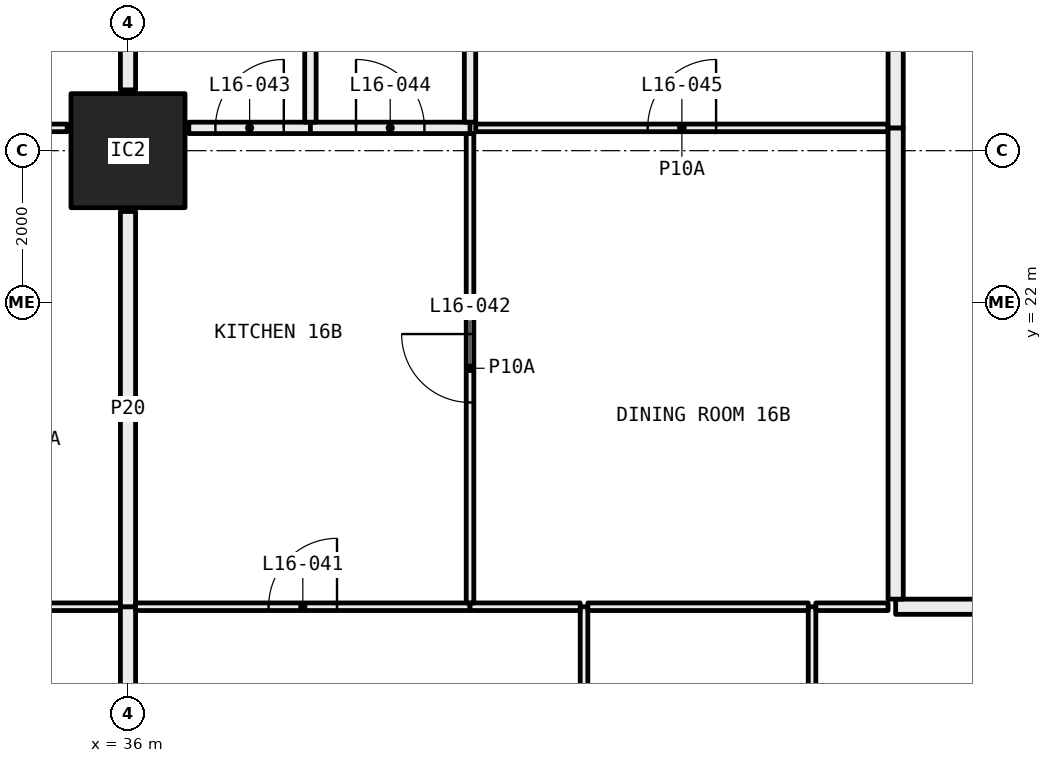
"""IFC4 building model, lengths in metres.
Left out: names, types, materials, properties, quantities, classifications, styles, units other than length and angle.
Written with IfcOpenShell. Run it as: python <this file> out.ifc"""

import sys

from ifc_helpers import new_model, si_unit, direction, frame, frame_2d, origin, origin_2d, place, context, subcontext, project, spatial, rectangle, hollow_rectangle, extrude, element, fill, save


model = new_model("IFC4")
c1 = context("Model", 3, precision=1e-05, world=origin(), true_north=direction((0.0, 1.0)))
c2 = subcontext(c1, "Body", "Model", "MODEL_VIEW")
j1 = project(units=[si_unit("LENGTHUNIT", "METRE"), si_unit("PLANEANGLEUNIT", "RADIAN")], contexts=[c1])
p1 = place(None, origin())
s1 = spatial("IfcSite", under=j1, at=p1, CompositionType="ELEMENT")
p2 = place(p1, origin())
s2 = spatial("IfcBuilding", under=s1, at=p2, CompositionType="ELEMENT")
p3 = place(p2, frame((0.0, 0.0, 67.95)))
s3 = spatial("IfcBuildingStorey", under=s2, at=p3, CompositionType="ELEMENT", Elevation=67.95)
p4 = place(p3, frame((36.0, 24.0, 0.0), z_axis=(0.0, 0.0, 1.0), x_axis=(1.0, 0.0, 0.0)))
e1 = element("IfcColumn", 1, at=p4, inside=s3, PredefinedType="COLUMN", context=c2, shape_type="SweptSolid", body=[
    extrude(hollow_rectangle(XDim=1.5, YDim=1.5, WallThickness=0.065, at=origin_2d()), origin(), (0.0, 0.0, 1.0), 3.05),
])
p5 = place(p3, frame((35.9, 18.0, 0.0), z_axis=(0.0, 0.0, 1.0), x_axis=(-1.0, 0.0, 0.0)))
e2 = element("IfcWall", 2, at=p5, inside=s3, PredefinedType="PARTITIONING", context=c2, shape_type="SweptSolid", body=[
    extrude(rectangle(XDim=4.4, YDim=0.1, at=frame_2d((2.2, 0.0))), origin(), (0.0, 0.0, 1.0), 3.05),
])
p6 = place(p3, frame((36.0, 12.8, 0.0), z_axis=(0.0, 0.0, 1.0), x_axis=(0.0, 1.0, 0.0)))
e3 = element("IfcWall", 3, at=p6, inside=s3, PredefinedType="PARTITIONING", context=c2, shape_type="SweptSolid", body=[
    extrude(rectangle(XDim=5.2, YDim=0.2, at=frame_2d((2.6, 0.0))), origin(), (0.0, 0.0, 1.0), 2.45),
])
p7 = place(p3, frame((35.2, 24.3, 0.0), z_axis=(0.0, 0.0, 1.0), x_axis=(-1.0, 0.0, 0.0)))
e4 = element("IfcWall", 4, at=p7, inside=s3, PredefinedType="PARTITIONING", context=c2, shape_type="SweptSolid", body=[
    extrude(rectangle(XDim=3.65, YDim=0.1, at=frame_2d((1.825, 0.0))), origin(), (0.0, 0.0, 1.0), 3.05),
])
p8 = place(p7, frame((1.375, 0.0, 0.0)))
e5 = element("IfcOpeningElement", 5, at=p8, cuts=e4, PredefinedType="OPENING", context=c2, shape_type="SweptSolid", body=[
    extrude(rectangle(XDim=0.9, YDim=2.1, at=frame_2d((0.45, 1.05))), frame((0.0, 0.06, 0.0), z_axis=(0.0, -1.0, 0.0), x_axis=(1.0, 0.0, 0.0)), (0.0, 0.0, 1.0), 0.12),
])
p9 = place(p3, frame((36.0, 18.0, 0.0), z_axis=(0.0, 0.0, 1.0), x_axis=(0.0, 1.0, 0.0)))
e6 = element("IfcWall", 6, at=p9, inside=s3, PredefinedType="PARTITIONING", context=c2, shape_type="SweptSolid", body=[
    extrude(rectangle(XDim=5.2, YDim=0.2, at=frame_2d((2.6, 0.0))), origin(), (0.0, 0.0, 1.0), 2.45),
])
p10 = place(p3, frame((36.0, 24.8, 0.0), z_axis=(0.0, 0.0, 1.0), x_axis=(0.0, 1.0, 0.0)))
e7 = element("IfcWall", 7, at=p10, inside=s3, PredefinedType="PARTITIONING", context=c2, shape_type="SweptSolid", body=[
    extrude(rectangle(XDim=1.75, YDim=0.2, at=frame_2d((0.875, 0.0))), origin(), (0.0, 0.0, 1.0), 2.45),
])
p11 = place(p3, frame((42.0, 12.05, 0.0), z_axis=(0.0, 0.0, 1.0), x_axis=(0.0, 1.0, 0.0)))
e8 = element("IfcWall", 8, at=p11, inside=s3, PredefinedType="PARTITIONING", context=c2, shape_type="SweptSolid", body=[
    extrude(rectangle(XDim=5.95, YDim=0.1, at=frame_2d((2.975, 0.0))), origin(), (0.0, 0.0, 1.0), 2.45),
])
p12 = place(p3, frame((40.5, 18.0, 0.0), z_axis=(0.0, 0.0, 1.0), x_axis=(-1.0, 0.0, 0.0)))
e9 = element("IfcWall", 9, at=p12, inside=s3, PredefinedType="PARTITIONING", context=c2, shape_type="SweptSolid", body=[
    extrude(rectangle(XDim=4.4, YDim=0.1, at=frame_2d((2.2, 0.0))), origin(), (0.0, 0.0, 1.0), 3.05),
])
p13 = place(p12, frame((1.75, 0.0, 0.0)))
e10 = element("IfcOpeningElement", 10, at=p13, cuts=e9, PredefinedType="OPENING", context=c2, shape_type="SweptSolid", body=[
    extrude(rectangle(XDim=0.9, YDim=2.1, at=frame_2d((0.45, 1.05))), frame((0.0, 0.06, 0.0), z_axis=(0.0, -1.0, 0.0), x_axis=(1.0, 0.0, 0.0)), (0.0, 0.0, 1.0), 0.12),
])
p14 = place(p3, frame((41.95, 18.0, 0.0), z_axis=(0.0, 0.0, 1.0), x_axis=(-1.0, 0.0, 0.0)))
e11 = element("IfcWall", 11, at=p14, inside=s3, PredefinedType="PARTITIONING", context=c2, shape_type="SweptSolid", body=[
    extrude(rectangle(XDim=1.45, YDim=0.1, at=frame_2d((0.725, 0.0))), origin(), (0.0, 0.0, 1.0), 3.05),
])
p15 = place(p3, frame((45.0, 12.05, 0.0), z_axis=(0.0, 0.0, 1.0), x_axis=(0.0, 1.0, 0.0)))
e12 = element("IfcWall", 12, at=p15, inside=s3, PredefinedType="PARTITIONING", context=c2, shape_type="SweptSolid", body=[
    extrude(rectangle(XDim=5.95, YDim=0.1, at=frame_2d((2.975, 0.0))), origin(), (0.0, 0.0, 1.0), 2.45),
])
p16 = place(p3, frame((44.95, 18.0, 0.0), z_axis=(0.0, 0.0, 1.0), x_axis=(-1.0, 0.0, 0.0)))
e13 = element("IfcWall", 13, at=p16, inside=s3, PredefinedType="PARTITIONING", context=c2, shape_type="SweptSolid", body=[
    extrude(rectangle(XDim=2.9, YDim=0.1, at=frame_2d((1.45, 0.0))), origin(), (0.0, 0.0, 1.0), 3.05),
])
p17 = place(p3, frame((46.0, 18.0, 0.0), z_axis=(0.0, 0.0, 1.0), x_axis=(-1.0, 0.0, 0.0)))
e14 = element("IfcWall", 14, at=p17, inside=s3, PredefinedType="PARTITIONING", context=c2, shape_type="SweptSolid", body=[
    extrude(rectangle(XDim=0.95, YDim=0.1, at=frame_2d((0.475, 0.0))), origin(), (0.0, 0.0, 1.0), 3.05),
])
p18 = place(p3, frame((49.5, 18.0, 0.0), z_axis=(0.0, 0.0, 1.0), x_axis=(-1.0, 0.0, 0.0)))
e15 = element("IfcWall", 15, at=p18, inside=s3, PredefinedType="PARTITIONING", context=c2, shape_type="SweptSolid", body=[
    extrude(rectangle(XDim=3.4, YDim=0.2, at=frame_2d((1.7, 0.0))), origin(), (0.0, 0.0, 1.0), 3.05),
])
p19 = place(p3, frame((40.5, 18.05, 0.0), z_axis=(0.0, 0.0, 1.0), x_axis=(0.0, 1.0, 0.0)))
e16 = element("IfcWall", 16, at=p19, inside=s3, PredefinedType="PARTITIONING", context=c2, shape_type="SweptSolid", body=[
    extrude(rectangle(XDim=6.175, YDim=0.1, at=frame_2d((3.087, 0.0))), origin(), (0.0, 0.0, 1.0), 2.45),
])
p20 = place(p19, frame((2.637, 0.0, 0.0)))
e17 = element("IfcOpeningElement", 17, at=p20, cuts=e16, PredefinedType="OPENING", context=c2, shape_type="SweptSolid", body=[
    extrude(rectangle(XDim=0.9, YDim=2.1, at=frame_2d((0.45, 1.05))), frame((0.0, 0.06, 0.0), z_axis=(0.0, -1.0, 0.0), x_axis=(1.0, 0.0, 0.0)), (0.0, 0.0, 1.0), 0.12),
])
p21 = place(p3, frame((38.4, 24.3, 0.0), z_axis=(0.0, 0.0, 1.0), x_axis=(-1.0, 0.0, 0.0)))
e18 = element("IfcWall", 18, at=p21, inside=s3, PredefinedType="PARTITIONING", context=c2, shape_type="SweptSolid", body=[
    extrude(rectangle(XDim=1.6, YDim=0.15, at=frame_2d((0.8, 0.0))), origin(), (0.0, 0.0, 1.0), 3.05),
])
p22 = place(p21, frame((0.35, 0.0, 0.0)))
e19 = element("IfcOpeningElement", 19, at=p22, cuts=e18, PredefinedType="OPENING", context=c2, shape_type="SweptSolid", body=[
    extrude(rectangle(XDim=0.9, YDim=2.1, at=frame_2d((0.45, 1.05))), frame((0.0, 0.085, 0.0), z_axis=(0.0, -1.0, 0.0), x_axis=(1.0, 0.0, 0.0)), (0.0, 0.0, 1.0), 0.17),
])
p23 = place(p3, frame((40.5, 24.3, 0.0), z_axis=(0.0, 0.0, 1.0), x_axis=(-1.0, 0.0, 0.0)))
e20 = element("IfcWall", 20, at=p23, inside=s3, PredefinedType="PARTITIONING", context=c2, shape_type="SweptSolid", body=[
    extrude(rectangle(XDim=2.1, YDim=0.15, at=frame_2d((1.05, 0.0))), origin(), (0.0, 0.0, 1.0), 3.05),
])
p24 = place(p23, frame((0.6, 0.0, 0.0)))
e21 = element("IfcOpeningElement", 21, at=p24, cuts=e20, PredefinedType="OPENING", context=c2, shape_type="SweptSolid", body=[
    extrude(rectangle(XDim=0.9, YDim=2.1, at=frame_2d((0.45, 1.05))), frame((0.0, 0.085, 0.0), z_axis=(0.0, -1.0, 0.0), x_axis=(1.0, 0.0, 0.0)), (0.0, 0.0, 1.0), 0.17),
])
p25 = place(p3, frame((46.0, 24.3, 0.0), z_axis=(0.0, 0.0, 1.0), x_axis=(-1.0, 0.0, 0.0)))
e22 = element("IfcWall", 22, at=p25, inside=s3, PredefinedType="PARTITIONING", context=c2, shape_type="SweptSolid", body=[
    extrude(rectangle(XDim=5.425, YDim=0.1, at=frame_2d((2.712, 0.0))), origin(), (0.0, 0.0, 1.0), 3.05),
])
p26 = place(p25, frame((2.262, 0.0, 0.0)))
e23 = element("IfcOpeningElement", 23, at=p26, cuts=e22, PredefinedType="OPENING", context=c2, shape_type="SweptSolid", body=[
    extrude(rectangle(XDim=0.9, YDim=2.1, at=frame_2d((0.45, 1.05))), frame((0.0, 0.06, 0.0), z_axis=(0.0, -1.0, 0.0), x_axis=(1.0, 0.0, 0.0)), (0.0, 0.0, 1.0), 0.12),
])
p27 = place(p3, frame((46.1, 18.1, 0.0), z_axis=(0.0, 0.0, 1.0), x_axis=(0.0, 1.0, 0.0)))
e24 = element("IfcWall", 24, at=p27, inside=s3, PredefinedType="PARTITIONING", context=c2, shape_type="SweptSolid", body=[
    extrude(rectangle(XDim=6.2, YDim=0.2, at=frame_2d((3.1, 0.0))), origin(), (0.0, 0.0, 1.0), 2.45),
])
p28 = place(p3, frame((38.4, 24.375, 0.0), z_axis=(0.0, 0.0, 1.0), x_axis=(0.0, 1.0, 0.0)))
e25 = element("IfcWall", 25, at=p28, inside=s3, PredefinedType="PARTITIONING", context=c2, shape_type="SweptSolid", body=[
    extrude(rectangle(XDim=2.1, YDim=0.15, at=frame_2d((1.05, 0.0))), origin(), (0.0, 0.0, 1.0), 3.05),
])
p29 = place(p3, frame((40.5, 24.375, 0.0), z_axis=(0.0, 0.0, 1.0), x_axis=(0.0, 1.0, 0.0)))
e26 = element("IfcWall", 26, at=p29, inside=s3, PredefinedType="PARTITIONING", context=c2, shape_type="SweptSolid", body=[
    extrude(rectangle(XDim=4.325, YDim=0.15, at=frame_2d((2.163, 0.0))), origin(), (0.0, 0.0, 1.0), 3.05),
])
p30 = place(p3, frame((46.1, 24.3, 0.0), z_axis=(0.0, 0.0, 1.0), x_axis=(0.0, 1.0, 0.0)))
e27 = element("IfcWall", 27, at=p30, inside=s3, PredefinedType="PARTITIONING", context=c2, shape_type="SweptSolid", body=[
    extrude(rectangle(XDim=4.5, YDim=0.2, at=frame_2d((2.25, 0.0))), origin(), (0.0, 0.0, 1.0), 3.05),
])
p31 = place(p13, frame((0.9, 0.0, 0.0), x_axis=(-1.0, 0.0, 0.0)))
e28 = element("IfcDoor", 28, at=p31, inside=s3, OperationType="SINGLE_SWING_LEFT", PredefinedType="DOOR", context=c2, shape_type="SweptSolid", body=[
    extrude(rectangle(XDim=0.9, YDim=2.1, at=frame_2d((0.45, 1.05))), frame((0.0, 0.025, 0.0), z_axis=(0.0, -1.0, 0.0), x_axis=(1.0, 0.0, 0.0)), (0.0, 0.0, 1.0), 0.05),
])
fill(e10, e28)
p32 = place(p20, origin())
e29 = element("IfcDoor", 29, at=p32, inside=s3, OperationType="SINGLE_SWING_LEFT", PredefinedType="DOOR", context=c2, shape_type="SweptSolid", body=[
    extrude(rectangle(XDim=0.9, YDim=2.1, at=frame_2d((0.45, 1.05))), frame((0.0, 0.025, 0.0), z_axis=(0.0, -1.0, 0.0), x_axis=(1.0, 0.0, 0.0)), (0.0, 0.0, 1.0), 0.05),
])
fill(e17, e29)
p33 = place(p22, frame((0.9, 0.0, 0.0), x_axis=(-1.0, 0.0, 0.0)))
e30 = element("IfcDoor", 30, at=p33, inside=s3, OperationType="SINGLE_SWING_LEFT", PredefinedType="DOOR", context=c2, shape_type="SweptSolid", body=[
    extrude(rectangle(XDim=0.9, YDim=2.1, at=frame_2d((0.45, 1.05))), frame((0.0, 0.025, 0.0), z_axis=(0.0, -1.0, 0.0), x_axis=(1.0, 0.0, 0.0)), (0.0, 0.0, 1.0), 0.05),
])
fill(e19, e30)
p34 = place(p24, frame((0.9, 0.0, 0.0), x_axis=(-1.0, 0.0, 0.0)))
e31 = element("IfcDoor", 31, at=p34, inside=s3, OperationType="SINGLE_SWING_RIGHT", PredefinedType="DOOR", context=c2, shape_type="SweptSolid", body=[
    extrude(rectangle(XDim=0.9, YDim=2.1, at=frame_2d((0.45, 1.05))), frame((0.0, 0.025, 0.0), z_axis=(0.0, -1.0, 0.0), x_axis=(1.0, 0.0, 0.0)), (0.0, 0.0, 1.0), 0.05),
])
fill(e21, e31)
p35 = place(p26, frame((0.9, 0.0, 0.0), x_axis=(-1.0, 0.0, 0.0)))
e32 = element("IfcDoor", 32, at=p35, inside=s3, OperationType="SINGLE_SWING_LEFT", PredefinedType="DOOR", context=c2, shape_type="SweptSolid", body=[
    extrude(rectangle(XDim=0.9, YDim=2.1, at=frame_2d((0.45, 1.05))), frame((0.0, 0.025, 0.0), z_axis=(0.0, -1.0, 0.0), x_axis=(1.0, 0.0, 0.0)), (0.0, 0.0, 1.0), 0.05),
])
fill(e23, e32)
save(model, sys.argv[1])
